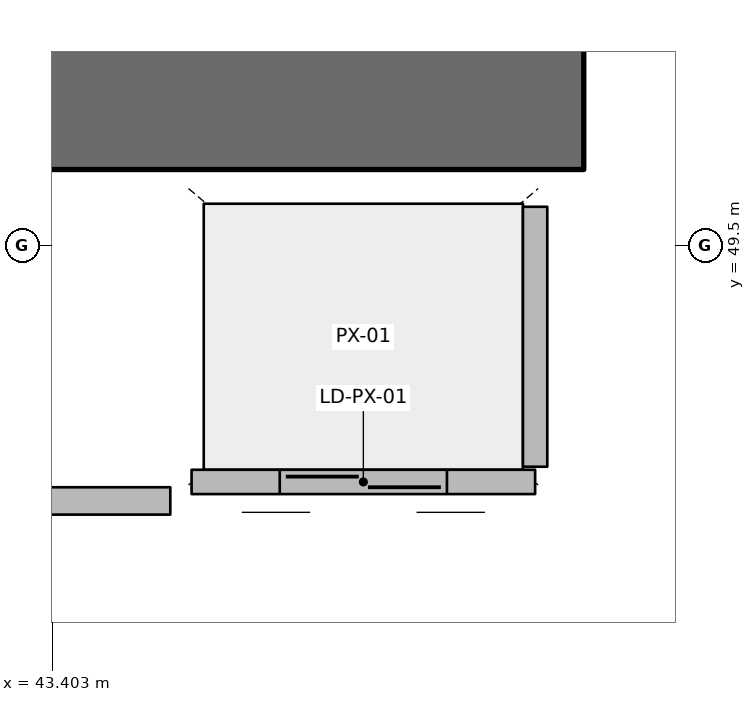
"""IFC4 building model, lengths in metres.
Left out: names, types, materials, properties, quantities, classifications, styles, units other than length and angle.
Written with IfcOpenShell. Run it as: python <this file> out.ifc"""

import sys

from ifc_helpers import new_model, si_unit, direction, frame, frame_2d, origin, place, context, subcontext, project, spatial, rectangle, extrude, element, fill, save


model = new_model("IFC4")
c1 = context("Model", 3, precision=1e-05, world=origin(), true_north=direction((0.0, 1.0)))
c2 = subcontext(c1, "Body", "Model", "MODEL_VIEW")
j1 = project(units=[si_unit("LENGTHUNIT", "METRE"), si_unit("PLANEANGLEUNIT", "RADIAN")], contexts=[c1])
p1 = place(None, origin())
s1 = spatial("IfcSite", under=j1, at=p1, CompositionType="ELEMENT")
p2 = place(p1, origin())
s2 = spatial("IfcBuilding", under=s1, at=p2, CompositionType="ELEMENT")
p3 = place(p2, origin())
s3 = spatial("IfcBuildingStorey", under=s2, at=p3, CompositionType="ELEMENT", Elevation=0.0)
p4 = place(p3, frame((36.7, 50.55, 0.0), z_axis=(0.0, 0.0, 1.0), x_axis=(1.0, 0.0, 0.0)))
e1 = element("IfcWall", 1, at=p4, inside=s3, PredefinedType="SHEAR", context=c2, shape_type="SweptSolid", body=[
    extrude(rectangle(XDim=10.2, YDim=1.1, at=frame_2d((5.1, 0.0))), origin(), (0.0, 0.0, 1.0), 7.2),
])
p5 = place(p3, frame((46.58, 47.945, 0.0), z_axis=(0.0, 0.0, 1.0), x_axis=(-1.0, 0.0, 0.0)))
e2 = element("IfcWall", 2, at=p5, inside=s3, PredefinedType="PARTITIONING", context=c2, shape_type="SweptSolid", body=[
    extrude(rectangle(XDim=2.26, YDim=0.16, at=frame_2d((1.13, 0.0))), origin(), (0.0, 0.0, 1.0), 6.8),
])
p6 = place(p5, frame((0.58, 0.0, 0.0)))
e3 = element("IfcOpeningElement", 3, at=p6, cuts=e2, PredefinedType="OPENING", context=c2, shape_type="SweptSolid", body=[
    extrude(rectangle(XDim=1.1, YDim=2.1, at=frame_2d((0.55, 1.05))), frame((0.0, 0.09, 0.0), z_axis=(0.0, -1.0, 0.0), x_axis=(1.0, 0.0, 0.0)), (0.0, 0.0, 1.0), 0.18),
])
p7 = place(p3, frame((46.58, 48.045, 0.0), z_axis=(0.0, 0.0, 1.0), x_axis=(0.0, 1.0, 0.0)))
e4 = element("IfcWall", 4, at=p7, inside=s3, PredefinedType="PARTITIONING", context=c2, shape_type="SweptSolid", body=[
    extrude(rectangle(XDim=1.71, YDim=0.16, at=frame_2d((0.855, 0.0))), origin(), (0.0, 0.0, 1.0), 6.8),
])
p8 = place(p3, frame((37.92, 47.82, 0.0), z_axis=(0.0, 0.0, 1.0), x_axis=(1.0, 0.0, 0.0)))
e5 = element("IfcWall", 5, at=p8, inside=s3, PredefinedType="PARTITIONING", context=c2, shape_type="SweptSolid", body=[
    extrude(rectangle(XDim=6.26, YDim=0.18, at=frame_2d((3.13, 0.0))), origin(), (0.0, 0.0, 1.0), 6.8),
])
p9 = place(p8, frame((2.705, 0.0, 0.0)))
e6 = element("IfcOpeningElement", 6, at=p9, cuts=e5, PredefinedType="OPENING", context=c2, shape_type="SweptSolid", body=[
    extrude(rectangle(XDim=0.85, YDim=2.06, at=frame_2d((0.425, 1.03))), frame((0.0, 0.1, 0.0), z_axis=(0.0, -1.0, 0.0), x_axis=(1.0, 0.0, 0.0)), (0.0, 0.0, 1.0), 0.2),
])
p10 = place(p6, origin())
e7 = element("IfcDoor", 7, at=p10, inside=s3, OperationType="DOUBLE_DOOR_SLIDING", PredefinedType="DOOR", context=c2, shape_type="SweptSolid", body=[
    extrude(rectangle(XDim=1.1, YDim=2.1, at=frame_2d((0.55, 1.05))), frame((0.0, 0.025, 0.0), z_axis=(0.0, -1.0, 0.0), x_axis=(1.0, 0.0, 0.0)), (0.0, 0.0, 1.0), 0.05),
])
fill(e3, e7)
save(model, sys.argv[1])
